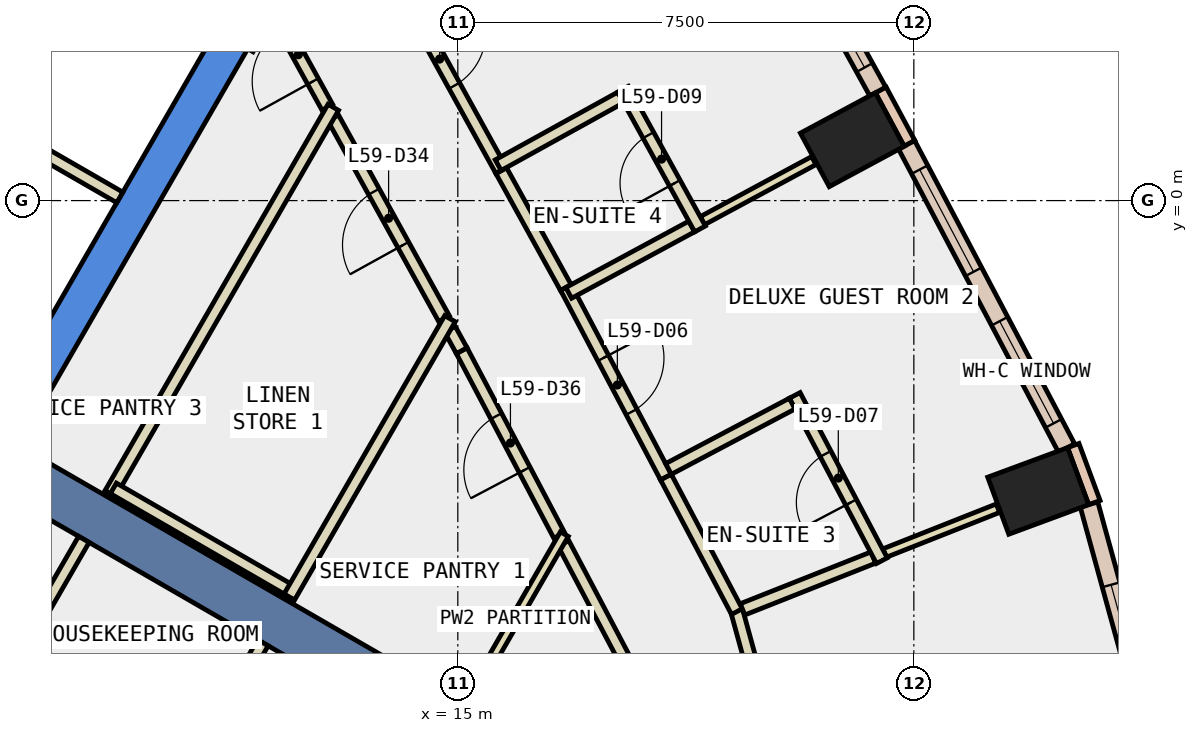
"""IFC4 building model, lengths in metres.
Left out: names, types, materials, properties, quantities, classifications, styles, units other than length and angle.
Written with IfcOpenShell. Run it as: python <this file> out.ifc"""

import sys

from ifc_helpers import new_model, si_unit, direction, frame, frame_2d, origin, origin_2d, place, context, subcontext, project, spatial, polyline, rectangle, outline, extrude, element, fill, save


model = new_model("IFC4")
c1 = context("Model", 3, precision=1e-05, world=origin(), true_north=direction((0.0, 1.0)))
c2 = subcontext(c1, "Body", "Model", "MODEL_VIEW")
j1 = project(units=[si_unit("LENGTHUNIT", "METRE"), si_unit("PLANEANGLEUNIT", "RADIAN")], contexts=[c1])
p1 = place(None, origin())
s1 = spatial("IfcSite", under=j1, at=p1, CompositionType="ELEMENT")
p2 = place(p1, origin())
s2 = spatial("IfcBuilding", under=s1, at=p2, CompositionType="ELEMENT")
p3 = place(p2, frame((0.0, 0.0, 259.4)))
s3 = spatial("IfcBuildingStorey", under=s2, at=p3, CompositionType="ELEMENT", Elevation=259.4)
for number, where, z_axis, x_axis in (
    (1, (24.545, -4.775, -0.34), (0.0, 0.0, 1.0), (-0.347, 0.938, 0.0)),
    (2, (21.488, 1.001, -0.34), (0.0, 0.0, 1.0), (-0.474, 0.881, 0.0)),
):
    element("IfcColumn", number, at=place(p3, frame(where, z_axis=z_axis, x_axis=x_axis)), inside=s3, PredefinedType="COLUMN", context=c2, shape_type="SweptSolid", body=[
        extrude(rectangle(XDim=1.0, YDim=1.4, at=origin_2d()), origin(), (0.0, 0.0, 1.0), 3.6),
    ])
p4 = place(p3, frame((0.0, 0.0, -0.34)))
e3 = element("IfcWall", 3, at=p4, inside=s3, PredefinedType="SHEAR", context=c2, shape_type="SweptSolid", body=[
    extrude(outline(polyline([(5.774, -7.5), (11.547, 2.5), (10.854, 2.5), (5.427, -6.9), (5.774, -7.5)])), origin(), (0.0, 0.0, 1.0), 3.6),
])
p5 = place(p3, frame((7.578, -4.375, -0.34), z_axis=(0.0, 0.0, 1.0), x_axis=(0.866024315419, -0.5000018851, 0.0)))
e4 = element("IfcWall", 4, at=p5, inside=s3, PredefinedType="SHEAR", context=c2, shape_type="SweptSolid", body=[
    extrude(rectangle(XDim=9.0, YDim=0.8, at=frame_2d((4.5, 0.0))), origin(), (0.0, 0.0, 1.0), 3.6),
])
p6 = place(p3, frame((25.469, -4.967, 0.0), z_axis=(0.0, 0.0, 1.0), x_axis=(-0.346892928577, 0.937904737222, 0.0)))
e5 = element("IfcWall", 5, at=p6, inside=s3, PredefinedType="STANDARD", context=c2, shape_type="SweptSolid", body=[
    extrude(rectangle(XDim=1.0, YDim=0.2, at=frame_2d((0.5, 0.0))), origin(), (0.0, 0.0, 1.0), 3.26),
])
p7 = place(p3, frame((22.429, 0.94, 0.0), z_axis=(0.0, 0.0, 1.0), x_axis=(-0.473663196434, 0.88070606694, 0.0)))
e6 = element("IfcWall", 6, at=p7, inside=s3, PredefinedType="STANDARD", context=c2, shape_type="SweptSolid", body=[
    extrude(rectangle(XDim=1.0, YDim=0.2, at=frame_2d((0.5, 0.0))), origin(), (0.0, 0.0, 1.0), 3.26),
])
p8 = place(p3, frame((26.477, -8.987, 0.0), z_axis=(0.0, 0.0, 1.0), x_axis=(-0.264924661919, 0.964269113633, 0.0)))
e7 = element("IfcWall", 7, at=p8, inside=s3, PredefinedType="STANDARD", context=c2, shape_type="SweptSolid", body=[
    extrude(rectangle(XDim=4.137, YDim=0.3, at=frame_2d((2.068, 0.0))), origin(), (0.0, 0.0, 1.0), 3.26),
])
p9 = place(p8, frame((1.368, 0.0, 0.9)))
e8 = element("IfcOpeningElement", 8, at=p9, cuts=e7, PredefinedType="OPENING", context=c2, shape_type="SweptSolid", body=[
    extrude(rectangle(XDim=1.4, YDim=2.0, at=frame_2d((0.7, 1.0))), frame((0.0, 0.16, 0.0), z_axis=(0.0, -1.0, 0.0), x_axis=(1.0, 0.0, 0.0)), (0.0, 0.0, 1.0), 0.32),
])
p10 = place(p3, frame((25.012, -4.07, 0.0), z_axis=(0.0, 0.0, 1.0), x_axis=(-0.466663589714, 0.884434900959, 0.0)))
e9 = element("IfcWall", 9, at=p10, inside=s3, PredefinedType="STANDARD", context=c2, shape_type="SweptSolid", body=[
    extrude(rectangle(XDim=5.638, YDim=0.3, at=frame_2d((2.819, 0.0))), origin(), (0.0, 0.0, 1.0), 3.26),
])
p11 = place(p10, frame((0.459, 0.0, 0.9)))
e10 = element("IfcOpeningElement", 10, at=p11, cuts=e9, PredefinedType="OPENING", context=c2, shape_type="SweptSolid", body=[
    extrude(rectangle(XDim=1.9, YDim=2.0, at=frame_2d((0.95, 1.0))), frame((0.0, 0.16, 0.0), z_axis=(0.0, -1.0, 0.0), x_axis=(1.0, 0.0, 0.0)), (0.0, 0.0, 1.0), 0.32),
])
p12 = place(p10, frame((3.278, 0.0, 0.9)))
e11 = element("IfcOpeningElement", 11, at=p12, cuts=e9, PredefinedType="OPENING", context=c2, shape_type="SweptSolid", body=[
    extrude(rectangle(XDim=1.9, YDim=2.0, at=frame_2d((0.95, 1.0))), frame((0.0, 0.16, 0.0), z_axis=(0.0, -1.0, 0.0), x_axis=(1.0, 0.0, 0.0)), (0.0, 0.0, 1.0), 0.32),
])
p13 = place(p3, frame((21.907, 1.794, 0.0), z_axis=(0.0, 0.0, 1.0), x_axis=(-0.483469062695, 0.875361448441, 0.0)))
e12 = element("IfcWall", 12, at=p13, inside=s3, PredefinedType="STANDARD", context=c2, shape_type="SweptSolid", body=[
    extrude(rectangle(XDim=5.601, YDim=0.3, at=frame_2d((2.801, 0.0))), origin(), (0.0, 0.0, 1.0), 3.26),
])
p14 = place(p13, frame((0.45, 0.0, 0.9)))
e13 = element("IfcOpeningElement", 13, at=p14, cuts=e12, PredefinedType="OPENING", context=c2, shape_type="SweptSolid", body=[
    extrude(rectangle(XDim=1.9, YDim=2.0, at=frame_2d((0.95, 1.0))), frame((0.0, 0.16, 0.0), z_axis=(0.0, -1.0, 0.0), x_axis=(1.0, 0.0, 0.0)), (0.0, 0.0, 1.0), 0.32),
])
p15 = place(p13, frame((3.251, 0.0, 0.9)))
e14 = element("IfcOpeningElement", 14, at=p15, cuts=e12, PredefinedType="OPENING", context=c2, shape_type="SweptSolid", body=[
    extrude(rectangle(XDim=1.9, YDim=2.0, at=frame_2d((0.95, 1.0))), frame((0.0, 0.16, 0.0), z_axis=(0.0, -1.0, 0.0), x_axis=(1.0, 0.0, 0.0)), (0.0, 0.0, 1.0), 0.32),
])
p16 = place(p3, frame((12.854, 1.535, 0.0), z_axis=(0.0, 0.0, 1.0), x_axis=(-0.483730980407, 0.875216738068, 0.0)))
e15 = element("IfcWall", 15, at=p16, inside=s3, PredefinedType="PARTITIONING", context=c2, shape_type="SweptSolid", body=[
    extrude(rectangle(XDim=1.974, YDim=0.2, at=frame_2d((0.987, 0.0))), origin(), (0.0, 0.0, 1.0), 3.26),
])
p17 = place(p16, frame((0.487, 0.0, 0.0)))
e16 = element("IfcOpeningElement", 16, at=p17, cuts=e15, PredefinedType="OPENING", context=c2, shape_type="SweptSolid", body=[
    extrude(rectangle(XDim=1.0, YDim=2.1, at=frame_2d((0.5, 1.05))), frame((0.0, 0.11, 0.0), z_axis=(0.0, -1.0, 0.0), x_axis=(1.0, 0.0, 0.0)), (0.0, 0.0, 1.0), 0.22),
])
p18 = place(p3, frame((11.893, 3.097, 0.0), z_axis=(0.0, 0.0, 1.0), x_axis=(-0.500911294014, -0.865498628265, 0.0)))
e17 = element("IfcWall", 17, at=p18, inside=s3, PredefinedType="PARTITIONING", context=c2, shape_type="SweptSolid", body=[
    extrude(rectangle(XDim=0.693, YDim=0.2, at=frame_2d((0.347, 0.0))), origin(), (0.0, 0.0, 1.0), 3.26),
])
p19 = place(p3, frame((14.773, -1.941, 0.0), z_axis=(0.0, 0.0, 1.0), x_axis=(-0.483431586589, 0.875382145744, 0.0)))
e18 = element("IfcWall", 18, at=p19, inside=s3, PredefinedType="PARTITIONING", context=c2, shape_type="SweptSolid", body=[
    extrude(rectangle(XDim=3.771, YDim=0.2, at=frame_2d((1.885, 0.0))), origin(), (0.0, 0.0, 1.0), 3.26),
])
p20 = place(p19, frame((1.385, 0.0, 0.0)))
e19 = element("IfcOpeningElement", 19, at=p20, cuts=e18, PredefinedType="OPENING", context=c2, shape_type="SweptSolid", body=[
    extrude(rectangle(XDim=1.0, YDim=2.1, at=frame_2d((0.5, 1.05))), frame((0.0, 0.11, 0.0), z_axis=(0.0, -1.0, 0.0), x_axis=(1.0, 0.0, 0.0)), (0.0, 0.0, 1.0), 0.22),
])
p21 = place(p3, frame((16.667, -5.505, 0.0), z_axis=(0.0, 0.0, 1.0), x_axis=(-0.466812680399, 0.884356218624, 0.0)))
e20 = element("IfcWall", 20, at=p21, inside=s3, PredefinedType="PARTITIONING", context=c2, shape_type="SweptSolid", body=[
    extrude(rectangle(XDim=3.434, YDim=0.2, at=frame_2d((1.717, 0.0))), origin(), (0.0, 0.0, 1.0), 3.26),
])
p22 = place(p21, frame((1.217, 0.0, 0.0)))
e21 = element("IfcOpeningElement", 21, at=p22, cuts=e20, PredefinedType="OPENING", context=c2, shape_type="SweptSolid", body=[
    extrude(rectangle(XDim=1.0, YDim=2.1, at=frame_2d((0.5, 1.05))), frame((0.0, 0.11, 0.0), z_axis=(0.0, -1.0, 0.0), x_axis=(1.0, 0.0, 0.0)), (0.0, 0.0, 1.0), 0.22),
])
p23 = place(p3, frame((15.064, -2.468, 0.0), z_axis=(0.0, 0.0, 1.0), x_axis=(-0.482338449744, 0.875984942735, 0.0)))
e22 = element("IfcWall", 22, at=p23, inside=s3, PredefinedType="PARTITIONING", context=c2, shape_type="SweptSolid", body=[
    extrude(rectangle(XDim=0.402, YDim=0.2, at=frame_2d((0.201, 0.0))), origin(), (0.0, 0.0, 1.0), 3.26),
])
p24 = place(p3, frame((17.766, -7.588, 0.0), z_axis=(0.0, 0.0, 1.0), x_axis=(-0.466727344864, 0.884401258228, 0.0)))
e23 = element("IfcWall", 23, at=p24, inside=s3, PredefinedType="PARTITIONING", context=c2, shape_type="SweptSolid", body=[
    extrude(rectangle(XDim=2.205, YDim=0.2, at=frame_2d((1.103, 0.0))), origin(), (0.0, 0.0, 1.0), 3.26),
])
p25 = place(p3, frame((19.564, -6.662, 0.0), z_axis=(0.0, 0.0, 1.0), x_axis=(0.264876135597, -0.96428244451, 0.0)))
e24 = element("IfcWall", 24, at=p25, inside=s3, PredefinedType="PARTITIONING", context=c2, shape_type="SweptSolid", body=[
    extrude(rectangle(XDim=3.077, YDim=0.2, at=frame_2d((1.538, 0.0))), origin(), (0.0, 0.0, 1.0), 3.26),
])
p26 = place(p3, frame((16.778, -1.429, 0.0), z_axis=(0.0, 0.0, 1.0), x_axis=(0.466493865945, -0.884524433261, 0.0)))
e25 = element("IfcWall", 25, at=p26, inside=s3, PredefinedType="PARTITIONING", context=c2, shape_type="SweptSolid", body=[
    extrude(rectangle(XDim=3.526, YDim=0.2, at=frame_2d((1.763, 0.0))), origin(), (0.0, 0.0, 1.0), 3.26),
])
p27 = place(p26, frame((1.313, 0.0, 0.0)))
e26 = element("IfcOpeningElement", 26, at=p27, cuts=e25, PredefinedType="OPENING", context=c2, shape_type="SweptSolid", body=[
    extrude(rectangle(XDim=1.0, YDim=2.1, at=frame_2d((0.5, 1.05))), frame((0.0, 0.11, 0.0), z_axis=(0.0, -1.0, 0.0), x_axis=(1.0, 0.0, 0.0)), (0.0, 0.0, 1.0), 0.22),
])
p28 = place(p3, frame((18.423, -4.548, 0.0), z_axis=(0.0, 0.0, 1.0), x_axis=(0.466792565793, -0.884366835946, 0.0)))
e27 = element("IfcWall", 27, at=p28, inside=s3, PredefinedType="PARTITIONING", context=c2, shape_type="SweptSolid", body=[
    extrude(rectangle(XDim=2.5, YDim=0.2, at=frame_2d((1.25, 0.0))), origin(), (0.0, 0.0, 1.0), 3.26),
])
p29 = place(p3, frame((13.641, 4.246, 0.0), z_axis=(0.0, 0.0, 1.0), x_axis=(0.483405752983, -0.875396411909, 0.0)))
e28 = element("IfcWall", 28, at=p29, inside=s3, PredefinedType="PARTITIONING", context=c2, shape_type="SweptSolid", body=[
    extrude(rectangle(XDim=4.284, YDim=0.2, at=frame_2d((2.142, 0.0))), origin(), (0.0, 0.0, 1.0), 3.26),
])
p30 = place(p29, frame((1.692, 0.0, 0.0)))
e29 = element("IfcOpeningElement", 29, at=p30, cuts=e28, PredefinedType="OPENING", context=c2, shape_type="SweptSolid", body=[
    extrude(rectangle(XDim=1.0, YDim=2.1, at=frame_2d((0.5, 1.05))), frame((0.0, 0.11, 0.0), z_axis=(0.0, -1.0, 0.0), x_axis=(1.0, 0.0, 0.0)), (0.0, 0.0, 1.0), 0.22),
])
p31 = place(p3, frame((15.715, 0.491, 0.0), z_axis=(0.0, 0.0, 1.0), x_axis=(0.483421428323, -0.875387755591, 0.0)))
e30 = element("IfcWall", 30, at=p31, inside=s3, PredefinedType="PARTITIONING", context=c2, shape_type="SweptSolid", body=[
    extrude(rectangle(XDim=2.194, YDim=0.2, at=frame_2d((1.097, 0.0))), origin(), (0.0, 0.0, 1.0), 3.26),
])
p32 = place(p3, frame((8.141, 0.801, 0.0), z_axis=(0.0, 0.0, 1.0), x_axis=(0.866434738017, -0.499290341141, 0.0)))
e31 = element("IfcWall", 31, at=p32, inside=s3, PredefinedType="PARTITIONING", context=c2, shape_type="SweptSolid", body=[
    extrude(rectangle(XDim=1.5, YDim=0.2, at=frame_2d((0.75, 0.0))), origin(), (0.0, 0.0, 1.0), 3.26),
])
p33 = place(p3, frame((7.8, -7.39, 0.0), z_axis=(0.0, 0.0, 1.0), x_axis=(0.499977374825, 0.866038466041, 0.0)))
e32 = element("IfcWall", 32, at=p33, inside=s3, PredefinedType="PARTITIONING", context=c2, shape_type="SweptSolid", body=[
    extrude(rectangle(XDim=2.1, YDim=0.2, at=frame_2d((1.05, 0.0))), origin(), (0.0, 0.0, 1.0), 3.26),
])
p34 = place(p3, frame((9.285, -4.818, 0.0), z_axis=(0.0, 0.0, 1.0), x_axis=(0.499962569651, 0.866047013128, 0.0)))
e33 = element("IfcWall", 33, at=p34, inside=s3, PredefinedType="PARTITIONING", context=c2, shape_type="SweptSolid", body=[
    extrude(rectangle(XDim=7.334, YDim=0.2, at=frame_2d((3.667, 0.0))), origin(), (0.0, 0.0, 1.0), 3.26),
])
p35 = place(p3, frame((9.335, -4.732, 0.0), z_axis=(0.0, 0.0, 1.0), x_axis=(0.866002606077, -0.500039484709, 0.0)))
e34 = element("IfcWall", 34, at=p35, inside=s3, PredefinedType="PARTITIONING", context=c2, shape_type="SweptSolid", body=[
    extrude(rectangle(XDim=3.4, YDim=0.2, at=frame_2d((1.7, 0.0))), origin(), (0.0, 0.0, 1.0), 3.26),
])
p36 = place(p3, frame((11.794, -7.271, 0.0), z_axis=(0.0, 0.0, 1.0), x_axis=(-0.499918457185, -0.866072477433, 0.0)))
e35 = element("IfcWall", 35, at=p36, inside=s3, PredefinedType="PARTITIONING", context=c2, shape_type="SweptSolid", body=[
    extrude(rectangle(XDim=5.607, YDim=0.2, at=frame_2d((2.803, 0.0))), origin(), (0.0, 0.0, 1.0), 3.26),
])
p37 = place(p3, frame((14.871, -1.942, 0.0), z_axis=(0.0, 0.0, 1.0), x_axis=(-0.50000507839, -0.866022471755, 0.0)))
e36 = element("IfcWall", 36, at=p37, inside=s3, PredefinedType="PARTITIONING", context=c2, shape_type="SweptSolid", body=[
    extrude(rectangle(XDim=5.284, YDim=0.2, at=frame_2d((2.642, 0.0))), origin(), (0.0, 0.0, 1.0), 3.26),
])
p38 = place(p3, frame((16.752, -5.485, 0.0), z_axis=(0.0, 0.0, 1.0), x_axis=(-0.499988848364, -0.866031842089, 0.0)))
e37 = element("IfcWall", 37, at=p38, inside=s3, PredefinedType="PARTITIONING", context=c2, shape_type="SweptSolid", body=[
    extrude(rectangle(XDim=3.226, YDim=0.15, at=frame_2d((1.613, 0.0))), origin(), (0.0, 0.0, 1.0), 3.26),
])
p39 = place(p3, frame((22.02, -5.796, 0.0), z_axis=(0.0, 0.0, 1.0), x_axis=(0.929915172208, 0.367774078066, 0.0)))
e38 = element("IfcWall", 38, at=p39, inside=s3, PredefinedType="PARTITIONING", context=c2, shape_type="SweptSolid", body=[
    extrude(rectangle(XDim=2.003, YDim=0.15, at=frame_2d((1.002, 0.0))), origin(), (0.0, 0.0, 1.0), 3.26),
])
p40 = place(p3, frame((19.683, -6.722, 0.0), z_axis=(0.0, 0.0, 1.0), x_axis=(0.929744903847, 0.368204309821, 0.0)))
e39 = element("IfcWall", 39, at=p40, inside=s3, PredefinedType="PARTITIONING", context=c2, shape_type="SweptSolid", body=[
    extrude(rectangle(XDim=2.313, YDim=0.2, at=frame_2d((1.157, 0.0))), origin(), (0.0, 0.0, 1.0), 3.26),
])
p41 = place(p3, frame((21.974, -5.922, 0.0), z_axis=(0.0, 0.0, 1.0), x_axis=(-0.466401249432, 0.88457327256, 0.0)))
e40 = element("IfcWall", 40, at=p41, inside=s3, PredefinedType="PARTITIONING", context=c2, shape_type="SweptSolid", body=[
    extrude(rectangle(XDim=3.073, YDim=0.2, at=frame_2d((1.536, 0.0))), origin(), (0.0, 0.0, 1.0), 3.26),
])
p42 = place(p41, frame((1.086, 0.0, 0.0)))
e41 = element("IfcOpeningElement", 41, at=p42, cuts=e40, PredefinedType="OPENING", context=c2, shape_type="SweptSolid", body=[
    extrude(rectangle(XDim=0.9, YDim=2.1, at=frame_2d((0.45, 1.05))), frame((0.0, 0.11, 0.0), z_axis=(0.0, -1.0, 0.0), x_axis=(1.0, 0.0, 0.0)), (0.0, 0.0, 1.0), 0.22),
])
p43 = place(p3, frame((20.499, -3.339, 0.0), z_axis=(0.0, 0.0, 1.0), x_axis=(-0.884293452572, -0.466931568583, 0.0)))
e42 = element("IfcWall", 42, at=p43, inside=s3, PredefinedType="PARTITIONING", context=c2, shape_type="SweptSolid", body=[
    extrude(rectangle(XDim=2.3, YDim=0.2, at=frame_2d((1.15, 0.0))), origin(), (0.0, 0.0, 1.0), 3.26),
])
p44 = place(p3, frame((19.023, -0.33, 0.0), z_axis=(0.0, 0.0, 1.0), x_axis=(0.880158309515, 0.474680261009, 0.0)))
e43 = element("IfcWall", 43, at=p44, inside=s3, PredefinedType="PARTITIONING", context=c2, shape_type="SweptSolid", body=[
    extrude(rectangle(XDim=2.082, YDim=0.15, at=frame_2d((1.041, 0.0))), origin(), (0.0, 0.0, 1.0), 3.26),
])
p45 = place(p3, frame((16.824, -1.518, 0.0), z_axis=(0.0, 0.0, 1.0), x_axis=(0.87996932648, 0.475030508972, 0.0)))
e44 = element("IfcWall", 44, at=p45, inside=s3, PredefinedType="PARTITIONING", context=c2, shape_type="SweptSolid", body=[
    extrude(rectangle(XDim=2.299, YDim=0.2, at=frame_2d((1.149, 0.0))), origin(), (0.0, 0.0, 1.0), 3.26),
])
p46 = place(p3, frame((18.984, -0.466, 0.0), z_axis=(0.0, 0.0, 1.0), x_axis=(-0.482922337539, 0.875663186337, 0.0)))
e45 = element("IfcWall", 45, at=p46, inside=s3, PredefinedType="PARTITIONING", context=c2, shape_type="SweptSolid", body=[
    extrude(rectangle(XDim=2.623, YDim=0.2, at=frame_2d((1.312, 0.0))), origin(), (0.0, 0.0, 1.0), 3.26),
])
p47 = place(p46, frame((0.861, 0.0, 0.0)))
e46 = element("IfcOpeningElement", 46, at=p47, cuts=e45, PredefinedType="OPENING", context=c2, shape_type="SweptSolid", body=[
    extrude(rectangle(XDim=0.9, YDim=2.1, at=frame_2d((0.45, 1.05))), frame((0.0, 0.11, 0.0), z_axis=(0.0, -1.0, 0.0), x_axis=(1.0, 0.0, 0.0)), (0.0, 0.0, 1.0), 0.22),
])
p48 = place(p3, frame((17.677, 1.695, 0.0), z_axis=(0.0, 0.0, 1.0), x_axis=(-0.875306576455, -0.483568399727, 0.0)))
e47 = element("IfcWall", 47, at=p48, inside=s3, PredefinedType="PARTITIONING", context=c2, shape_type="SweptSolid", body=[
    extrude(rectangle(XDim=2.3, YDim=0.2, at=frame_2d((1.15, 0.0))), origin(), (0.0, 0.0, 1.0), 3.26),
])
p49 = place(p3, frame((4.806, 1.176, 0.0), z_axis=(0.0, 0.0, 1.0), x_axis=(0.866059941101, 0.499940174841, 0.0)))
e48 = element("IfcWall", 48, at=p49, inside=s3, PredefinedType="STANDARD", context=c2, shape_type="SweptSolid", body=[
    extrude(rectangle(XDim=4.4, YDim=0.2, at=frame_2d((2.2, 0.0))), origin(), (0.0, 0.0, 1.0), 3.26),
])
p50 = place(p49, frame((2.4, 0.0, 0.0)))
e49 = element("IfcOpeningElement", 49, at=p50, cuts=e48, PredefinedType="OPENING", context=c2, shape_type="SweptSolid", body=[
    extrude(rectangle(XDim=1.1, YDim=2.2, at=frame_2d((0.55, 1.1))), frame((0.0, 0.11, 0.0), z_axis=(0.0, -1.0, 0.0), x_axis=(1.0, 0.0, 0.0)), (0.0, 0.0, 1.0), 0.22),
])
p51 = place(p9, origin())
e50 = element("IfcWindow", 50, at=p51, inside=s3, PartitioningType="SINGLE_PANEL", PredefinedType="WINDOW", context=c2, shape_type="SweptSolid", body=[
    extrude(rectangle(XDim=1.4, YDim=2.0, at=frame_2d((0.7, 1.0))), frame((0.0, 0.03, 0.0), z_axis=(0.0, -1.0, 0.0), x_axis=(1.0, 0.0, 0.0)), (0.0, 0.0, 1.0), 0.06),
])
fill(e8, e50)
p52 = place(p11, origin())
e51 = element("IfcWindow", 51, at=p52, inside=s3, PartitioningType="SINGLE_PANEL", PredefinedType="WINDOW", context=c2, shape_type="SweptSolid", body=[
    extrude(rectangle(XDim=1.9, YDim=2.0, at=frame_2d((0.95, 1.0))), frame((0.0, 0.03, 0.0), z_axis=(0.0, -1.0, 0.0), x_axis=(1.0, 0.0, 0.0)), (0.0, 0.0, 1.0), 0.06),
])
fill(e10, e51)
p53 = place(p12, origin())
e52 = element("IfcWindow", 52, at=p53, inside=s3, PartitioningType="SINGLE_PANEL", PredefinedType="WINDOW", context=c2, shape_type="SweptSolid", body=[
    extrude(rectangle(XDim=1.9, YDim=2.0, at=frame_2d((0.95, 1.0))), frame((0.0, 0.03, 0.0), z_axis=(0.0, -1.0, 0.0), x_axis=(1.0, 0.0, 0.0)), (0.0, 0.0, 1.0), 0.06),
])
fill(e11, e52)
p54 = place(p14, origin())
e53 = element("IfcWindow", 53, at=p54, inside=s3, PartitioningType="SINGLE_PANEL", PredefinedType="WINDOW", context=c2, shape_type="SweptSolid", body=[
    extrude(rectangle(XDim=1.9, YDim=2.0, at=frame_2d((0.95, 1.0))), frame((0.0, 0.03, 0.0), z_axis=(0.0, -1.0, 0.0), x_axis=(1.0, 0.0, 0.0)), (0.0, 0.0, 1.0), 0.06),
])
fill(e13, e53)
p55 = place(p27, origin())
e54 = element("IfcDoor", 54, at=p55, inside=s3, OperationType="SINGLE_SWING_RIGHT", PredefinedType="DOOR", context=c2, shape_type="SweptSolid", body=[
    extrude(rectangle(XDim=1.0, YDim=2.1, at=frame_2d((0.5, 1.05))), frame((0.0, 0.025, 0.0), z_axis=(0.0, -1.0, 0.0), x_axis=(1.0, 0.0, 0.0)), (0.0, 0.0, 1.0), 0.05),
])
fill(e26, e54)
p56 = place(p42, origin())
e55 = element("IfcDoor", 55, at=p56, inside=s3, OperationType="SINGLE_SWING_RIGHT", PredefinedType="DOOR", context=c2, shape_type="SweptSolid", body=[
    extrude(rectangle(XDim=0.9, YDim=2.1, at=frame_2d((0.45, 1.05))), frame((0.0, 0.025, 0.0), z_axis=(0.0, -1.0, 0.0), x_axis=(1.0, 0.0, 0.0)), (0.0, 0.0, 1.0), 0.05),
])
fill(e41, e55)
p57 = place(p30, origin())
e56 = element("IfcDoor", 56, at=p57, inside=s3, OperationType="SINGLE_SWING_RIGHT", PredefinedType="DOOR", context=c2, shape_type="SweptSolid", body=[
    extrude(rectangle(XDim=1.0, YDim=2.1, at=frame_2d((0.5, 1.05))), frame((0.0, 0.025, 0.0), z_axis=(0.0, -1.0, 0.0), x_axis=(1.0, 0.0, 0.0)), (0.0, 0.0, 1.0), 0.05),
])
fill(e29, e56)
p58 = place(p47, origin())
e57 = element("IfcDoor", 57, at=p58, inside=s3, OperationType="SINGLE_SWING_LEFT", PredefinedType="DOOR", context=c2, shape_type="SweptSolid", body=[
    extrude(rectangle(XDim=0.9, YDim=2.1, at=frame_2d((0.45, 1.05))), frame((0.0, 0.025, 0.0), z_axis=(0.0, -1.0, 0.0), x_axis=(1.0, 0.0, 0.0)), (0.0, 0.0, 1.0), 0.05),
])
fill(e46, e57)
p59 = place(p20, origin())
e58 = element("IfcDoor", 58, at=p59, inside=s3, OperationType="SINGLE_SWING_LEFT", PredefinedType="DOOR", context=c2, shape_type="SweptSolid", body=[
    extrude(rectangle(XDim=1.0, YDim=2.1, at=frame_2d((0.5, 1.05))), frame((0.0, 0.025, 0.0), z_axis=(0.0, -1.0, 0.0), x_axis=(1.0, 0.0, 0.0)), (0.0, 0.0, 1.0), 0.05),
])
fill(e19, e58)
p60 = place(p22, origin())
e59 = element("IfcDoor", 59, at=p60, inside=s3, OperationType="SINGLE_SWING_RIGHT", PredefinedType="DOOR", context=c2, shape_type="SweptSolid", body=[
    extrude(rectangle(XDim=1.0, YDim=2.1, at=frame_2d((0.5, 1.05))), frame((0.0, 0.025, 0.0), z_axis=(0.0, -1.0, 0.0), x_axis=(1.0, 0.0, 0.0)), (0.0, 0.0, 1.0), 0.05),
])
fill(e21, e59)
p61 = place(p17, origin())
e60 = element("IfcDoor", 60, at=p61, inside=s3, OperationType="SINGLE_SWING_LEFT", PredefinedType="DOOR", context=c2, shape_type="SweptSolid", body=[
    extrude(rectangle(XDim=1.0, YDim=2.1, at=frame_2d((0.5, 1.05))), frame((0.0, 0.025, 0.0), z_axis=(0.0, -1.0, 0.0), x_axis=(1.0, 0.0, 0.0)), (0.0, 0.0, 1.0), 0.05),
])
fill(e16, e60)
save(model, sys.argv[1])
